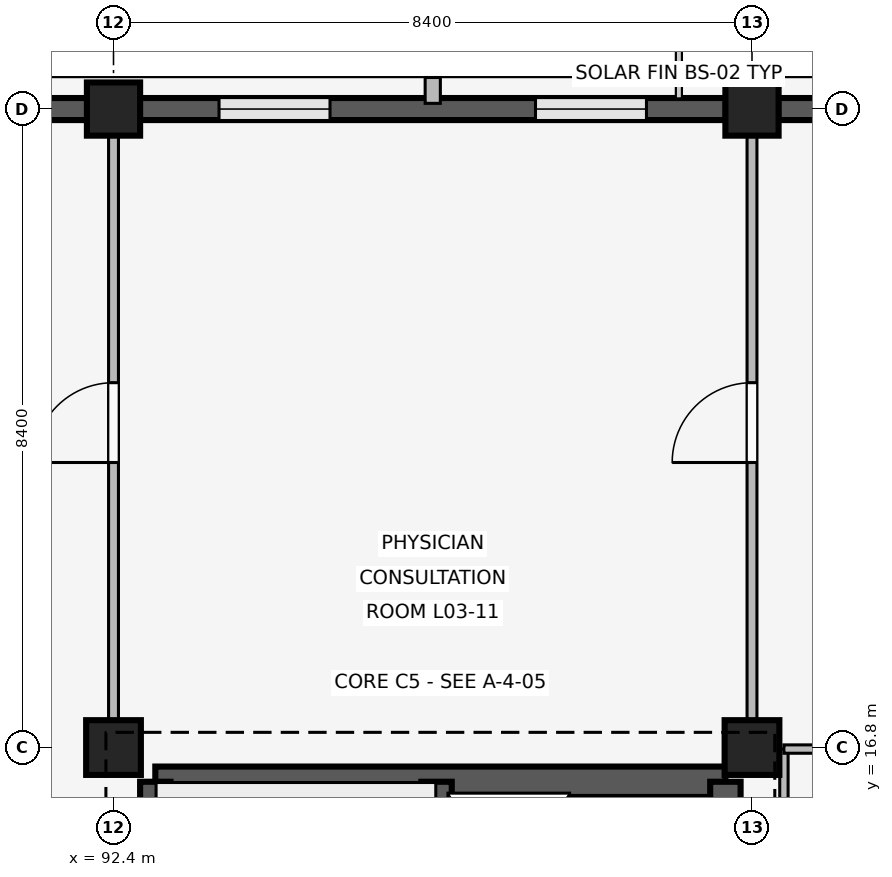
"""IFC4 building model, lengths in metres.
Left out: names, types, materials, properties, quantities, classifications, styles, units other than length and angle.
Written with IfcOpenShell. Run it as: python <this file> out.ifc"""

import sys

from ifc_helpers import new_model, si_unit, direction, frame, frame_2d, origin, origin_2d, place, context, subcontext, project, spatial, rectangle, extrude, element, fill, save


model = new_model("IFC4")
c1 = context("Model", 3, precision=1e-05, world=origin(), true_north=direction((0.0, 1.0)))
c2 = subcontext(c1, "Body", "Model", "MODEL_VIEW")
j1 = project(units=[si_unit("LENGTHUNIT", "METRE"), si_unit("PLANEANGLEUNIT", "RADIAN")], contexts=[c1])
p1 = place(None, origin())
s1 = spatial("IfcSite", under=j1, at=p1, CompositionType="ELEMENT")
p2 = place(p1, origin())
s2 = spatial("IfcBuilding", under=s1, at=p2, CompositionType="ELEMENT")
p3 = place(p2, frame((0.0, 0.0, 12.9)))
s3 = spatial("IfcBuildingStorey", under=s2, at=p3, CompositionType="ELEMENT", Elevation=12.9)
p4 = place(p3, frame((92.4, 16.8, 0.0), z_axis=(0.0, 0.0, 1.0), x_axis=(1.0, 0.0, 0.0)))
e1 = element("IfcColumn", 1, at=p4, inside=s3, PredefinedType="COLUMN", context=c2, shape_type="SweptSolid", body=[
    extrude(rectangle(XDim=0.72, YDim=0.72, at=origin_2d()), origin(), (0.0, 0.0, 1.0), 3.3),
])
p5 = place(p3, frame((92.4, 25.2, 0.0), z_axis=(0.0, 0.0, 1.0), x_axis=(1.0, 0.0, 0.0)))
e2 = element("IfcColumn", 2, at=p5, inside=s3, PredefinedType="COLUMN", context=c2, shape_type="SweptSolid", body=[
    extrude(rectangle(XDim=0.7, YDim=0.7, at=origin_2d()), origin(), (0.0, 0.0, 1.0), 3.3),
])
p6 = place(p3, frame((100.8, 16.8, 0.0), z_axis=(0.0, 0.0, 1.0), x_axis=(1.0, 0.0, 0.0)))
e3 = element("IfcColumn", 3, at=p6, inside=s3, PredefinedType="COLUMN", context=c2, shape_type="SweptSolid", body=[
    extrude(rectangle(XDim=0.72, YDim=0.72, at=origin_2d()), origin(), (0.0, 0.0, 1.0), 3.3),
])
p7 = place(p3, frame((100.8, 25.2, 0.0), z_axis=(0.0, 0.0, 1.0), x_axis=(1.0, 0.0, 0.0)))
e4 = element("IfcColumn", 4, at=p7, inside=s3, PredefinedType="COLUMN", context=c2, shape_type="SweptSolid", body=[
    extrude(rectangle(XDim=0.7, YDim=0.7, at=origin_2d()), origin(), (0.0, 0.0, 1.0), 3.3),
])
p8 = place(p3, frame((84.345, 25.2, 0.0), z_axis=(0.0, 0.0, 1.0), x_axis=(1.0, 0.0, 0.0)))
e5 = element("IfcWall", 5, at=p8, inside=s3, PredefinedType="SOLIDWALL", context=c2, shape_type="SweptSolid", body=[
    extrude(rectangle(XDim=7.71, YDim=0.29, at=frame_2d((3.855, 0.0))), origin(), (0.0, 0.0, 1.0), 2.44),
])
p9 = place(p8, frame((0.963, 0.0, 0.85)))
e6 = element("IfcOpeningElement", 6, at=p9, cuts=e5, PredefinedType="OPENING", context=c2, shape_type="SweptSolid", body=[
    extrude(rectangle(XDim=1.62, YDim=0.95, at=frame_2d((0.81, 0.475))), frame((0.0, 0.155, 0.0), z_axis=(0.0, -1.0, 0.0), x_axis=(1.0, 0.0, 0.0)), (0.0, 0.0, 1.0), 0.31),
])
p10 = place(p8, frame((5.127, 0.0, 0.85)))
e7 = element("IfcOpeningElement", 7, at=p10, cuts=e5, PredefinedType="OPENING", context=c2, shape_type="SweptSolid", body=[
    extrude(rectangle(XDim=1.62, YDim=0.95, at=frame_2d((0.81, 0.475))), frame((0.0, 0.155, 0.0), z_axis=(0.0, -1.0, 0.0), x_axis=(1.0, 0.0, 0.0)), (0.0, 0.0, 1.0), 0.31),
])
p11 = place(p3, frame((92.745, 25.2, 0.0), z_axis=(0.0, 0.0, 1.0), x_axis=(1.0, 0.0, 0.0)))
e8 = element("IfcWall", 8, at=p11, inside=s3, PredefinedType="SOLIDWALL", context=c2, shape_type="SweptSolid", body=[
    extrude(rectangle(XDim=7.71, YDim=0.29, at=frame_2d((3.855, 0.0))), origin(), (0.0, 0.0, 1.0), 2.44),
])
p12 = place(p11, frame((1.043, 0.0, 0.85)))
e9 = element("IfcOpeningElement", 9, at=p12, cuts=e8, PredefinedType="OPENING", context=c2, shape_type="SweptSolid", body=[
    extrude(rectangle(XDim=1.46, YDim=0.85, at=frame_2d((0.73, 0.425))), frame((0.0, 0.155, 0.0), z_axis=(0.0, -1.0, 0.0), x_axis=(1.0, 0.0, 0.0)), (0.0, 0.0, 1.0), 0.31),
])
p13 = place(p11, frame((5.207, 0.0, 0.85)))
e10 = element("IfcOpeningElement", 10, at=p13, cuts=e8, PredefinedType="OPENING", context=c2, shape_type="SweptSolid", body=[
    extrude(rectangle(XDim=1.46, YDim=0.85, at=frame_2d((0.73, 0.425))), frame((0.0, 0.155, 0.0), z_axis=(0.0, -1.0, 0.0), x_axis=(1.0, 0.0, 0.0)), (0.0, 0.0, 1.0), 0.31),
])
p14 = place(p3, frame((96.6, 25.275, 0.0), z_axis=(0.0, 0.0, 1.0), x_axis=(0.0, 1.0, 0.0)))
e11 = element("IfcWall", 11, at=p14, inside=s3, PredefinedType="ELEMENTEDWALL", context=c2, shape_type="SweptSolid", body=[
    extrude(rectangle(XDim=0.34, YDim=0.2, at=frame_2d((0.17, 0.0))), origin(), (0.0, 0.0, 1.0), 2.42),
])
p15 = place(p3, frame((101.145, 25.2, 0.0), z_axis=(0.0, 0.0, 1.0), x_axis=(1.0, 0.0, 0.0)))
e12 = element("IfcWall", 12, at=p15, inside=s3, PredefinedType="SOLIDWALL", context=c2, shape_type="SweptSolid", body=[
    extrude(rectangle(XDim=7.71, YDim=0.29, at=frame_2d((3.855, 0.0))), origin(), (0.0, 0.0, 1.0), 2.44),
])
p16 = place(p15, frame((0.963, 0.0, 0.85)))
e13 = element("IfcOpeningElement", 13, at=p16, cuts=e12, PredefinedType="OPENING", context=c2, shape_type="SweptSolid", body=[
    extrude(rectangle(XDim=1.62, YDim=0.95, at=frame_2d((0.81, 0.475))), frame((0.0, 0.155, 0.0), z_axis=(0.0, -1.0, 0.0), x_axis=(1.0, 0.0, 0.0)), (0.0, 0.0, 1.0), 0.31),
])
p17 = place(p15, frame((5.127, 0.0, 0.85)))
e14 = element("IfcOpeningElement", 14, at=p17, cuts=e12, PredefinedType="OPENING", context=c2, shape_type="SweptSolid", body=[
    extrude(rectangle(XDim=1.62, YDim=0.95, at=frame_2d((0.81, 0.475))), frame((0.0, 0.155, 0.0), z_axis=(0.0, -1.0, 0.0), x_axis=(1.0, 0.0, 0.0)), (0.0, 0.0, 1.0), 0.31),
])
p18 = place(p3, frame((92.95, 16.35, 0.0), z_axis=(0.0, 0.0, 1.0), x_axis=(1.0, 0.0, 0.0)))
e15 = element("IfcWall", 15, at=p18, inside=s3, PredefinedType="SHEAR", context=c2, shape_type="SweptSolid", body=[
    extrude(rectangle(XDim=7.5, YDim=0.4, at=frame_2d((3.75, 0.0))), origin(), (0.0, 0.0, 1.0), 3.02),
])
p19 = place(p3, frame((92.95, 8.8, 0.0), z_axis=(0.0, 0.0, 1.0), x_axis=(0.0, 1.0, 0.0)))
e16 = element("IfcWall", 16, at=p19, inside=s3, PredefinedType="SHEAR", context=c2, shape_type="SweptSolid", body=[
    extrude(rectangle(XDim=7.55, YDim=0.4, at=frame_2d((3.775, 0.0))), origin(), (0.0, 0.0, 1.0), 3.02),
])
p20 = place(p19, frame((0.28, 0.0, 0.0)))
e17 = element("IfcOpeningElement", 17, at=p20, cuts=e16, PredefinedType="OPENING", context=c2, shape_type="SweptSolid", body=[
    extrude(rectangle(XDim=1.0, YDim=2.15, at=frame_2d((0.5, 1.075))), frame((0.0, 0.21, 0.0), z_axis=(0.0, -1.0, 0.0), x_axis=(1.0, 0.0, 0.0)), (0.0, 0.0, 1.0), 0.42),
])
p21 = place(p3, frame((100.45, 8.8, 0.0), z_axis=(0.0, 0.0, 1.0), x_axis=(0.0, 1.0, 0.0)))
e18 = element("IfcWall", 18, at=p21, inside=s3, PredefinedType="SHEAR", context=c2, shape_type="SweptSolid", body=[
    extrude(rectangle(XDim=7.55, YDim=0.4, at=frame_2d((3.775, 0.0))), origin(), (0.0, 0.0, 1.0), 3.02),
])
p22 = place(p21, frame((2.4, 0.0, 0.0)))
e19 = element("IfcOpeningElement", 19, at=p22, cuts=e18, PredefinedType="OPENING", context=c2, shape_type="SweptSolid", body=[
    extrude(rectangle(XDim=1.2, YDim=2.2, at=frame_2d((0.6, 1.1))), frame((0.0, 0.21, 0.0), z_axis=(0.0, -1.0, 0.0), x_axis=(1.0, 0.0, 0.0)), (0.0, 0.0, 1.0), 0.42),
])
p23 = place(p3, frame((96.65, 8.8, 0.0), z_axis=(0.0, 0.0, 1.0), x_axis=(0.0, 1.0, 0.0)))
e20 = element("IfcWall", 20, at=p23, inside=s3, PredefinedType="SHEAR", context=c2, shape_type="SweptSolid", body=[
    extrude(rectangle(XDim=7.55, YDim=0.4, at=frame_2d((3.775, 0.0))), origin(), (0.0, 0.0, 1.0), 3.02),
])
p24 = place(p23, frame((0.28, 0.0, 0.0)))
e21 = element("IfcOpeningElement", 21, at=p24, cuts=e20, PredefinedType="OPENING", context=c2, shape_type="SweptSolid", body=[
    extrude(rectangle(XDim=1.0, YDim=2.15, at=frame_2d((0.5, 1.075))), frame((0.0, 0.21, 0.0), z_axis=(0.0, -1.0, 0.0), x_axis=(1.0, 0.0, 0.0)), (0.0, 0.0, 1.0), 0.42),
])
p25 = place(p3, frame((92.4, 17.15, 0.0), z_axis=(0.0, 0.0, 1.0), x_axis=(0.0, 1.0, 0.0)))
e22 = element("IfcWall", 22, at=p25, inside=s3, PredefinedType="PARTITIONING", context=c2, shape_type="SweptSolid", body=[
    extrude(rectangle(XDim=7.91, YDim=0.13, at=frame_2d((3.955, 0.0))), origin(), (0.0, 0.0, 1.0), 2.42),
])
p26 = place(p25, frame((3.4, 0.0, 0.0)))
e23 = element("IfcOpeningElement", 23, at=p26, cuts=e22, PredefinedType="OPENING", context=c2, shape_type="SweptSolid", body=[
    extrude(rectangle(XDim=1.05, YDim=2.2, at=frame_2d((0.525, 1.1))), frame((0.0, 0.075, 0.0), z_axis=(0.0, -1.0, 0.0), x_axis=(1.0, 0.0, 0.0)), (0.0, 0.0, 1.0), 0.15),
])
p27 = place(p3, frame((100.8, 17.15, 0.0), z_axis=(0.0, 0.0, 1.0), x_axis=(0.0, 1.0, 0.0)))
e24 = element("IfcWall", 24, at=p27, inside=s3, PredefinedType="PARTITIONING", context=c2, shape_type="SweptSolid", body=[
    extrude(rectangle(XDim=7.91, YDim=0.13, at=frame_2d((3.955, 0.0))), origin(), (0.0, 0.0, 1.0), 2.42),
])
p28 = place(p27, frame((3.4, 0.0, 0.0)))
e25 = element("IfcOpeningElement", 25, at=p28, cuts=e24, PredefinedType="OPENING", context=c2, shape_type="SweptSolid", body=[
    extrude(rectangle(XDim=1.05, YDim=2.2, at=frame_2d((0.525, 1.1))), frame((0.0, 0.075, 0.0), z_axis=(0.0, -1.0, 0.0), x_axis=(1.0, 0.0, 0.0)), (0.0, 0.0, 1.0), 0.15),
])
p29 = place(p3, frame((101.22, 14.17, 0.0), z_axis=(0.0, 0.0, 1.0), x_axis=(0.0, 1.0, 0.0)))
e26 = element("IfcWall", 26, at=p29, inside=s3, PredefinedType="PARTITIONING", context=c2, shape_type="SweptSolid", body=[
    extrude(rectangle(XDim=2.61, YDim=0.11, at=frame_2d((1.305, 0.0))), origin(), (0.0, 0.0, 1.0), 2.42),
])
p30 = place(p3, frame((101.22, 16.78, 0.0), z_axis=(0.0, 0.0, 1.0), x_axis=(1.0, 0.0, 0.0)))
e27 = element("IfcWall", 27, at=p30, inside=s3, PredefinedType="PARTITIONING", context=c2, shape_type="SweptSolid", body=[
    extrude(rectangle(XDim=1.98, YDim=0.11, at=frame_2d((0.99, 0.0))), origin(), (0.0, 0.0, 1.0), 2.42),
])
p31 = place(p30, frame((0.54, 0.0, 0.0)))
e28 = element("IfcOpeningElement", 28, at=p31, cuts=e27, PredefinedType="OPENING", context=c2, shape_type="SweptSolid", body=[
    extrude(rectangle(XDim=0.9, YDim=2.1, at=frame_2d((0.45, 1.05))), frame((0.0, 0.065, 0.0), z_axis=(0.0, -1.0, 0.0), x_axis=(1.0, 0.0, 0.0)), (0.0, 0.0, 1.0), 0.13),
])
p32 = place(p12, origin())
e29 = element("IfcWindow", 29, at=p32, inside=s3, PartitioningType="SINGLE_PANEL", PredefinedType="WINDOW", context=c2, shape_type="SweptSolid", body=[
    extrude(rectangle(XDim=1.46, YDim=0.85, at=frame_2d((0.73, 0.425))), frame((0.0, 0.03, 0.0), z_axis=(0.0, -1.0, 0.0), x_axis=(1.0, 0.0, 0.0)), (0.0, 0.0, 1.0), 0.06),
])
fill(e9, e29)
p33 = place(p13, origin())
e30 = element("IfcWindow", 30, at=p33, inside=s3, PartitioningType="SINGLE_PANEL", PredefinedType="WINDOW", context=c2, shape_type="SweptSolid", body=[
    extrude(rectangle(XDim=1.46, YDim=0.85, at=frame_2d((0.73, 0.425))), frame((0.0, 0.03, 0.0), z_axis=(0.0, -1.0, 0.0), x_axis=(1.0, 0.0, 0.0)), (0.0, 0.0, 1.0), 0.06),
])
fill(e10, e30)
p34 = place(p26, origin())
e31 = element("IfcDoor", 31, at=p34, inside=s3, OperationType="SINGLE_SWING_LEFT", PredefinedType="DOOR", context=c2, shape_type="SweptSolid", body=[
    extrude(rectangle(XDim=1.05, YDim=2.2, at=frame_2d((0.525, 1.1))), frame((0.0, 0.025, 0.0), z_axis=(0.0, -1.0, 0.0), x_axis=(1.0, 0.0, 0.0)), (0.0, 0.0, 1.0), 0.05),
])
fill(e23, e31)
p35 = place(p28, origin())
e32 = element("IfcDoor", 32, at=p35, inside=s3, OperationType="SINGLE_SWING_LEFT", PredefinedType="DOOR", context=c2, shape_type="SweptSolid", body=[
    extrude(rectangle(XDim=1.05, YDim=2.2, at=frame_2d((0.525, 1.1))), frame((0.0, 0.025, 0.0), z_axis=(0.0, -1.0, 0.0), x_axis=(1.0, 0.0, 0.0)), (0.0, 0.0, 1.0), 0.05),
])
fill(e25, e32)
save(model, sys.argv[1])
